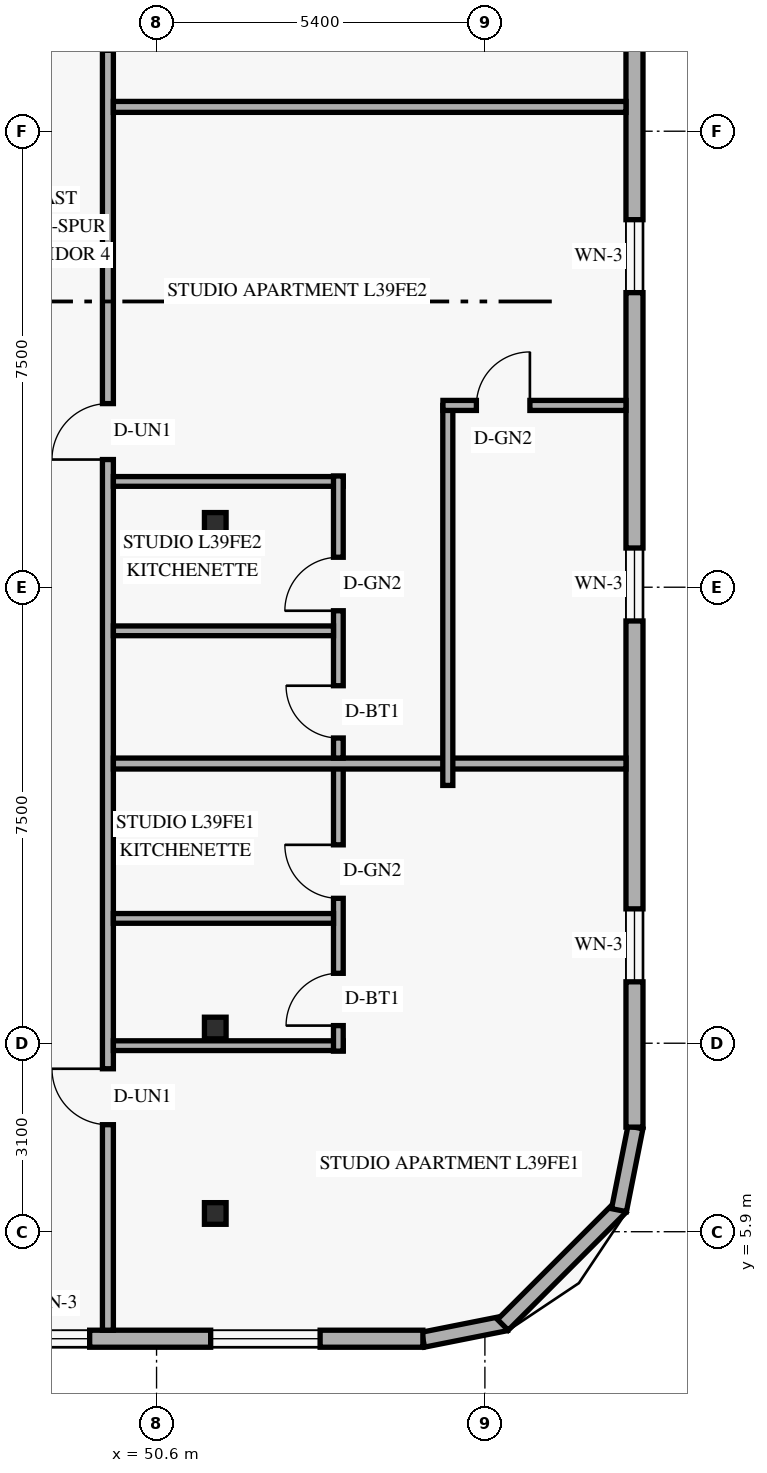
"""IFC4 building model, lengths in metres.
Left out: names, types, materials, properties, quantities, classifications, styles, units other than length and angle.
Written with IfcOpenShell. Run it as: python <this file> out.ifc"""

import sys

from ifc_helpers import new_model, si_unit, direction, frame, frame_2d, origin, origin_2d, place, context, subcontext, project, spatial, rectangle, hollow_rectangle, extrude, element, fill, save


model = new_model("IFC4")
c1 = context("Model", 3, precision=1e-05, world=origin(), true_north=direction((0.0, 1.0)))
c2 = subcontext(c1, "Body", "Model", "MODEL_VIEW")
j1 = project(units=[si_unit("LENGTHUNIT", "METRE"), si_unit("PLANEANGLEUNIT", "RADIAN")], contexts=[c1])
p1 = place(None, origin())
s1 = spatial("IfcSite", under=j1, at=p1, CompositionType="ELEMENT")
p2 = place(p1, origin())
s2 = spatial("IfcBuilding", under=s1, at=p2, CompositionType="ELEMENT")
p3 = place(p2, frame((0.0, 0.0, 151.8)))
s3 = spatial("IfcBuildingStorey", under=s2, at=p3, CompositionType="ELEMENT", Elevation=151.8)
for number, where, z_axis, x_axis in (
    (1, (51.461, 6.2, 0.0), (0.058, 0.0, 0.998), (0.0, 1.0, 0.0)),
    (2, (51.461, 9.25, 0.0), (0.058, 0.0, 0.998), (0.0, 1.0, 0.0)),
    (3, (51.461, 17.55, 0.0), (0.058, 0.0, 0.998), (0.0, 1.0, 0.0)),
):
    element("IfcColumn", number, at=place(p3, frame(where, z_axis=z_axis, x_axis=x_axis)), inside=s3, PredefinedType="COLUMN", context=c2, shape_type="SweptSolid", body=[
        extrude(hollow_rectangle(XDim=0.356, YDim=0.356, WallThickness=0.016, at=origin_2d()), origin(), (0.0, 0.0, 1.0), 3.606),
    ])
p4 = place(p3, frame((54.983, 4.124, 0.0), z_axis=(0.0, 0.0, 1.0), x_axis=(0.980809899341, 0.19496651342, 0.0)))
e4 = element("IfcWall", 4, at=p4, inside=s3, PredefinedType="SOLIDWALL", context=c2, shape_type="SweptSolid", body=[
    extrude(rectangle(XDim=1.389, YDim=0.25, at=frame_2d((0.694, 0.0))), origin(), (0.0, 0.0, 1.0), 3.36),
])
p5 = place(p3, frame((56.295, 4.368, 0.0), z_axis=(0.0, 0.0, 1.0), x_axis=(0.707106781187, 0.707106781187, 0.0)))
e5 = element("IfcWall", 5, at=p5, inside=s3, PredefinedType="SOLIDWALL", context=c2, shape_type="SweptSolid", body=[
    extrude(rectangle(XDim=2.739, YDim=0.25, at=frame_2d((1.37, 0.0))), origin(), (0.0, 0.0, 1.0), 3.36),
])
p6 = place(p3, frame((58.205, 6.254, 0.0), z_axis=(0.0, 0.0, 1.0), x_axis=(0.19496651342, 0.980809899341, 0.0)))
e6 = element("IfcWall", 6, at=p6, inside=s3, PredefinedType="SOLIDWALL", context=c2, shape_type="SweptSolid", body=[
    extrude(rectangle(XDim=1.389, YDim=0.25, at=frame_2d((0.694, 0.0))), origin(), (0.0, 0.0, 1.0), 3.36),
])
p7 = place(p3, frame((21.22, 4.14, 0.0), z_axis=(0.0, 0.0, 1.0), x_axis=(1.0, 0.0, 0.0)))
e7 = element("IfcWall", 7, at=p7, inside=s3, PredefinedType="SOLIDWALL", context=c2, shape_type="SweptSolid", body=[
    extrude(rectangle(XDim=33.76, YDim=0.28, at=frame_2d((16.88, 0.0))), origin(), (0.0, 0.0, 1.0), 3.36),
])
p8 = place(p7, frame((2.605, 0.0, 0.85)))
e8 = element("IfcOpeningElement", 8, at=p8, cuts=e7, PredefinedType="OPENING", context=c2, shape_type="SweptSolid", body=[
    extrude(rectangle(XDim=1.8, YDim=1.6, at=frame_2d((0.9, 0.8))), frame((0.0, 0.15, 0.0), z_axis=(0.0, -1.0, 0.0), x_axis=(1.0, 0.0, 0.0)), (0.0, 0.0, 1.0), 0.3),
])
p9 = place(p7, frame((9.49, 0.0, 0.85)))
e9 = element("IfcOpeningElement", 9, at=p9, cuts=e7, PredefinedType="OPENING", context=c2, shape_type="SweptSolid", body=[
    extrude(rectangle(XDim=1.8, YDim=1.6, at=frame_2d((0.9, 0.8))), frame((0.0, 0.15, 0.0), z_axis=(0.0, -1.0, 0.0), x_axis=(1.0, 0.0, 0.0)), (0.0, 0.0, 1.0), 0.3),
])
p10 = place(p7, frame((14.765, 0.0, 0.85)))
e10 = element("IfcOpeningElement", 10, at=p10, cuts=e7, PredefinedType="OPENING", context=c2, shape_type="SweptSolid", body=[
    extrude(rectangle(XDim=1.8, YDim=1.6, at=frame_2d((0.9, 0.8))), frame((0.0, 0.15, 0.0), z_axis=(0.0, -1.0, 0.0), x_axis=(1.0, 0.0, 0.0)), (0.0, 0.0, 1.0), 0.3),
])
p11 = place(p7, frame((19.325, 0.0, 0.85)))
e11 = element("IfcOpeningElement", 11, at=p11, cuts=e7, PredefinedType="OPENING", context=c2, shape_type="SweptSolid", body=[
    extrude(rectangle(XDim=1.8, YDim=1.6, at=frame_2d((0.9, 0.8))), frame((0.0, 0.15, 0.0), z_axis=(0.0, -1.0, 0.0), x_axis=(1.0, 0.0, 0.0)), (0.0, 0.0, 1.0), 0.3),
])
p12 = place(p7, frame((24.15, 0.0, 0.85)))
e12 = element("IfcOpeningElement", 12, at=p12, cuts=e7, PredefinedType="OPENING", context=c2, shape_type="SweptSolid", body=[
    extrude(rectangle(XDim=1.8, YDim=1.6, at=frame_2d((0.9, 0.8))), frame((0.0, 0.15, 0.0), z_axis=(0.0, -1.0, 0.0), x_axis=(1.0, 0.0, 0.0)), (0.0, 0.0, 1.0), 0.3),
])
p13 = place(p7, frame((27.08, 0.0, 0.85)))
e13 = element("IfcOpeningElement", 13, at=p13, cuts=e7, PredefinedType="OPENING", context=c2, shape_type="SweptSolid", body=[
    extrude(rectangle(XDim=1.2, YDim=1.5, at=frame_2d((0.6, 0.75))), frame((0.0, 0.15, 0.0), z_axis=(0.0, -1.0, 0.0), x_axis=(1.0, 0.0, 0.0)), (0.0, 0.0, 1.0), 0.3),
])
p14 = place(p7, frame((30.27, 0.0, 0.85)))
e14 = element("IfcOpeningElement", 14, at=p14, cuts=e7, PredefinedType="OPENING", context=c2, shape_type="SweptSolid", body=[
    extrude(rectangle(XDim=1.8, YDim=1.6, at=frame_2d((0.9, 0.8))), frame((0.0, 0.15, 0.0), z_axis=(0.0, -1.0, 0.0), x_axis=(1.0, 0.0, 0.0)), (0.0, 0.0, 1.0), 0.3),
])
p15 = place(p3, frame((58.46, 7.62, 0.0), z_axis=(0.0, 0.0, 1.0), x_axis=(0.0, 1.0, 0.0)))
e15 = element("IfcWall", 15, at=p15, inside=s3, PredefinedType="SOLIDWALL", context=c2, shape_type="SweptSolid", body=[
    extrude(rectangle(XDim=32.76, YDim=0.28, at=frame_2d((16.38, 0.0))), origin(), (0.0, 0.0, 1.0), 3.36),
])
p16 = place(p15, frame((2.39, 0.0, 0.85)))
e16 = element("IfcOpeningElement", 16, at=p16, cuts=e15, PredefinedType="OPENING", context=c2, shape_type="SweptSolid", body=[
    extrude(rectangle(XDim=1.2, YDim=1.5, at=frame_2d((0.6, 0.75))), frame((0.0, 0.15, 0.0), z_axis=(0.0, -1.0, 0.0), x_axis=(1.0, 0.0, 0.0)), (0.0, 0.0, 1.0), 0.3),
])
p17 = place(p15, frame((8.325, 0.0, 0.85)))
e17 = element("IfcOpeningElement", 17, at=p17, cuts=e15, PredefinedType="OPENING", context=c2, shape_type="SweptSolid", body=[
    extrude(rectangle(XDim=1.2, YDim=1.5, at=frame_2d((0.6, 0.75))), frame((0.0, 0.15, 0.0), z_axis=(0.0, -1.0, 0.0), x_axis=(1.0, 0.0, 0.0)), (0.0, 0.0, 1.0), 0.3),
])
p18 = place(p15, frame((13.725, 0.0, 0.85)))
e18 = element("IfcOpeningElement", 18, at=p18, cuts=e15, PredefinedType="OPENING", context=c2, shape_type="SweptSolid", body=[
    extrude(rectangle(XDim=1.2, YDim=1.5, at=frame_2d((0.6, 0.75))), frame((0.0, 0.15, 0.0), z_axis=(0.0, -1.0, 0.0), x_axis=(1.0, 0.0, 0.0)), (0.0, 0.0, 1.0), 0.3),
])
p19 = place(p15, frame((19.649, 0.0, 0.85)))
e19 = element("IfcOpeningElement", 19, at=p19, cuts=e15, PredefinedType="OPENING", context=c2, shape_type="SweptSolid", body=[
    extrude(rectangle(XDim=1.2, YDim=1.5, at=frame_2d((0.6, 0.75))), frame((0.0, 0.15, 0.0), z_axis=(0.0, -1.0, 0.0), x_axis=(1.0, 0.0, 0.0)), (0.0, 0.0, 1.0), 0.3),
])
p20 = place(p15, frame((24.849, 0.0, 0.85)))
e20 = element("IfcOpeningElement", 20, at=p20, cuts=e15, PredefinedType="OPENING", context=c2, shape_type="SweptSolid", body=[
    extrude(rectangle(XDim=1.2, YDim=1.5, at=frame_2d((0.6, 0.75))), frame((0.0, 0.15, 0.0), z_axis=(0.0, -1.0, 0.0), x_axis=(1.0, 0.0, 0.0)), (0.0, 0.0, 1.0), 0.3),
])
p21 = place(p15, frame((29.37, 0.0, 0.85)))
e21 = element("IfcOpeningElement", 21, at=p21, cuts=e15, PredefinedType="OPENING", context=c2, shape_type="SweptSolid", body=[
    extrude(rectangle(XDim=1.2, YDim=1.5, at=frame_2d((0.6, 0.75))), frame((0.0, 0.15, 0.0), z_axis=(0.0, -1.0, 0.0), x_axis=(1.0, 0.0, 0.0)), (0.0, 0.0, 1.0), 0.3),
])
p22 = place(p3, frame((49.8, 4.28, 0.0), z_axis=(0.0, 0.0, 1.0), x_axis=(0.0, 1.0, 0.0)))
e22 = element("IfcWall", 22, at=p22, inside=s3, PredefinedType="STANDARD", context=c2, shape_type="SweptSolid", body=[
    extrude(rectangle(XDim=39.44, YDim=0.18, at=frame_2d((19.72, 0.0))), origin(), (0.0, 0.0, 1.0), 2.73),
])
p23 = place(p22, frame((3.38, 0.0, 0.0)))
e23 = element("IfcOpeningElement", 23, at=p23, cuts=e22, PredefinedType="OPENING", context=c2, shape_type="SweptSolid", body=[
    extrude(rectangle(XDim=0.92, YDim=2.15, at=frame_2d((0.46, 1.075))), frame((0.0, 0.1, 0.0), z_axis=(0.0, -1.0, 0.0), x_axis=(1.0, 0.0, 0.0)), (0.0, 0.0, 1.0), 0.2),
])
p24 = place(p22, frame((14.32, 0.0, 0.0)))
e24 = element("IfcOpeningElement", 24, at=p24, cuts=e22, PredefinedType="OPENING", context=c2, shape_type="SweptSolid", body=[
    extrude(rectangle(XDim=0.92, YDim=2.15, at=frame_2d((0.46, 1.075))), frame((0.0, 0.1, 0.0), z_axis=(0.0, -1.0, 0.0), x_axis=(1.0, 0.0, 0.0)), (0.0, 0.0, 1.0), 0.2),
])
p25 = place(p22, frame((21.05, 0.0, 0.0)))
e25 = element("IfcOpeningElement", 25, at=p25, cuts=e22, PredefinedType="OPENING", context=c2, shape_type="SweptSolid", body=[
    extrude(rectangle(XDim=0.92, YDim=2.15, at=frame_2d((0.46, 1.075))), frame((0.0, 0.1, 0.0), z_axis=(0.0, -1.0, 0.0), x_axis=(1.0, 0.0, 0.0)), (0.0, 0.0, 1.0), 0.2),
])
p26 = place(p22, frame((35.42, 0.0, 0.0)))
e26 = element("IfcOpeningElement", 26, at=p26, cuts=e22, PredefinedType="OPENING", context=c2, shape_type="SweptSolid", body=[
    extrude(rectangle(XDim=0.92, YDim=2.15, at=frame_2d((0.46, 1.075))), frame((0.0, 0.1, 0.0), z_axis=(0.0, -1.0, 0.0), x_axis=(1.0, 0.0, 0.0)), (0.0, 0.0, 1.0), 0.2),
])
p27 = place(p3, frame((49.89, 8.96, 0.0), z_axis=(0.0, 0.0, 1.0), x_axis=(1.0, 0.0, 0.0)))
e27 = element("IfcWall", 27, at=p27, inside=s3, PredefinedType="PLUMBINGWALL", context=c2, shape_type="SweptSolid", body=[
    extrude(rectangle(XDim=3.78, YDim=0.16, at=frame_2d((1.89, 0.0))), origin(), (0.0, 0.0, 1.0), 2.879),
])
p28 = place(p3, frame((53.59, 8.87, 0.0), z_axis=(0.0, 0.0, 1.0), x_axis=(0.0, 1.0, 0.0)))
e28 = element("IfcWall", 28, at=p28, inside=s3, PredefinedType="PLUMBINGWALL", context=c2, shape_type="SweptSolid", body=[
    extrude(rectangle(XDim=4.73, YDim=0.16, at=frame_2d((2.365, 0.0))), origin(), (0.0, 0.0, 1.0), 3.36),
])
p29 = place(p28, frame((0.42, 0.0, 0.0)))
e29 = element("IfcOpeningElement", 29, at=p29, cuts=e28, PredefinedType="OPENING", context=c2, shape_type="SweptSolid", body=[
    extrude(rectangle(XDim=0.86, YDim=2.12, at=frame_2d((0.43, 1.06))), frame((0.0, 0.09, 0.0), z_axis=(0.0, -1.0, 0.0), x_axis=(1.0, 0.0, 0.0)), (0.0, 0.0, 1.0), 0.18),
])
p30 = place(p28, frame((2.513, 0.0, 0.0)))
e30 = element("IfcOpeningElement", 30, at=p30, cuts=e28, PredefinedType="OPENING", context=c2, shape_type="SweptSolid", body=[
    extrude(rectangle(XDim=0.88, YDim=2.12, at=frame_2d((0.44, 1.06))), frame((0.0, 0.09, 0.0), z_axis=(0.0, -1.0, 0.0), x_axis=(1.0, 0.0, 0.0)), (0.0, 0.0, 1.0), 0.18),
])
p31 = place(p3, frame((49.89, 11.053, 0.0), z_axis=(0.0, 0.0, 1.0), x_axis=(1.0, 0.0, 0.0)))
e31 = element("IfcWall", 31, at=p31, inside=s3, PredefinedType="PLUMBINGWALL", context=c2, shape_type="SweptSolid", body=[
    extrude(rectangle(XDim=3.62, YDim=0.16, at=frame_2d((1.81, 0.0))), origin(), (0.0, 0.0, 1.0), 2.879),
])
p32 = place(p3, frame((49.89, 13.6, 0.0), z_axis=(0.0, 0.0, 1.0), x_axis=(1.0, 0.0, 0.0)))
e32 = element("IfcWall", 32, at=p32, inside=s3, PredefinedType="PARTITIONING", context=c2, shape_type="SweptSolid", body=[
    extrude(rectangle(XDim=8.43, YDim=0.18, at=frame_2d((4.215, 0.0))), origin(), (0.0, 0.0, 1.0), 2.879),
])
p33 = place(p3, frame((49.89, 18.24, 0.0), z_axis=(0.0, 0.0, 1.0), x_axis=(1.0, 0.0, 0.0)))
e33 = element("IfcWall", 33, at=p33, inside=s3, PredefinedType="PLUMBINGWALL", context=c2, shape_type="SweptSolid", body=[
    extrude(rectangle(XDim=3.78, YDim=0.16, at=frame_2d((1.89, 0.0))), origin(), (0.0, 0.0, 1.0), 2.879),
])
p34 = place(p3, frame((53.59, 13.69, 0.0), z_axis=(0.0, 0.0, 1.0), x_axis=(0.0, 1.0, 0.0)))
e34 = element("IfcWall", 34, at=p34, inside=s3, PredefinedType="PLUMBINGWALL", context=c2, shape_type="SweptSolid", body=[
    extrude(rectangle(XDim=4.64, YDim=0.16, at=frame_2d((2.32, 0.0))), origin(), (0.0, 0.0, 1.0), 3.36),
])
p35 = place(p34, frame((0.33, 0.0, 0.0)))
e35 = element("IfcOpeningElement", 35, at=p35, cuts=e34, PredefinedType="OPENING", context=c2, shape_type="SweptSolid", body=[
    extrude(rectangle(XDim=0.86, YDim=2.12, at=frame_2d((0.43, 1.06))), frame((0.0, 0.09, 0.0), z_axis=(0.0, -1.0, 0.0), x_axis=(1.0, 0.0, 0.0)), (0.0, 0.0, 1.0), 0.18),
])
p36 = place(p34, frame((2.423, 0.0, 0.0)))
e36 = element("IfcOpeningElement", 36, at=p36, cuts=e34, PredefinedType="OPENING", context=c2, shape_type="SweptSolid", body=[
    extrude(rectangle(XDim=0.88, YDim=2.12, at=frame_2d((0.44, 1.06))), frame((0.0, 0.09, 0.0), z_axis=(0.0, -1.0, 0.0), x_axis=(1.0, 0.0, 0.0)), (0.0, 0.0, 1.0), 0.18),
])
p37 = place(p3, frame((49.89, 15.783, 0.0), z_axis=(0.0, 0.0, 1.0), x_axis=(1.0, 0.0, 0.0)))
e37 = element("IfcWall", 37, at=p37, inside=s3, PredefinedType="PLUMBINGWALL", context=c2, shape_type="SweptSolid", body=[
    extrude(rectangle(XDim=3.62, YDim=0.16, at=frame_2d((1.81, 0.0))), origin(), (0.0, 0.0, 1.0), 2.879),
])
p38 = place(p3, frame((55.39, 13.24, 0.0), z_axis=(0.0, 0.0, 1.0), x_axis=(0.0, 1.0, 0.0)))
e38 = element("IfcWall", 38, at=p38, inside=s3, PredefinedType="PARTITIONING", context=c2, shape_type="SweptSolid", body=[
    extrude(rectangle(XDim=6.25, YDim=0.165, at=frame_2d((3.125, 0.0))), origin(), (0.0, 0.0, 1.0), 3.36),
])
p39 = place(p3, frame((55.31, 19.49, 0.0), z_axis=(0.0, 0.0, 1.0), x_axis=(1.0, 0.0, 0.0)))
e39 = element("IfcWall", 39, at=p39, inside=s3, PredefinedType="PARTITIONING", context=c2, shape_type="SweptSolid", body=[
    extrude(rectangle(XDim=3.01, YDim=0.165, at=frame_2d((1.505, 0.0))), origin(), (0.0, 0.0, 1.0), 3.36),
])
p40 = place(p39, frame((0.55, 0.0, 0.0)))
e40 = element("IfcOpeningElement", 40, at=p40, cuts=e39, PredefinedType="OPENING", context=c2, shape_type="SweptSolid", body=[
    extrude(rectangle(XDim=0.88, YDim=2.12, at=frame_2d((0.44, 1.06))), frame((0.0, 0.093, 0.0), z_axis=(0.0, -1.0, 0.0), x_axis=(1.0, 0.0, 0.0)), (0.0, 0.0, 1.0), 0.185),
])
p41 = place(p3, frame((49.89, 24.4, 0.0), z_axis=(0.0, 0.0, 1.0), x_axis=(1.0, 0.0, 0.0)))
e41 = element("IfcWall", 41, at=p41, inside=s3, PredefinedType="PARTITIONING", context=c2, shape_type="SweptSolid", body=[
    extrude(rectangle(XDim=8.43, YDim=0.18, at=frame_2d((4.215, 0.0))), origin(), (0.0, 0.0, 1.0), 2.879),
])
p42 = place(p13, origin())
e42 = element("IfcWindow", 42, at=p42, inside=s3, PartitioningType="SINGLE_PANEL", PredefinedType="WINDOW", context=c2, shape_type="SweptSolid", body=[
    extrude(rectangle(XDim=1.2, YDim=1.5, at=frame_2d((0.6, 0.75))), frame((0.0, 0.03, 0.0), z_axis=(0.0, -1.0, 0.0), x_axis=(1.0, 0.0, 0.0)), (0.0, 0.0, 1.0), 0.06),
])
fill(e13, e42)
p43 = place(p14, origin())
e43 = element("IfcWindow", 43, at=p43, inside=s3, PartitioningType="SINGLE_PANEL", PredefinedType="WINDOW", context=c2, shape_type="SweptSolid", body=[
    extrude(rectangle(XDim=1.8, YDim=1.6, at=frame_2d((0.9, 0.8))), frame((0.0, 0.03, 0.0), z_axis=(0.0, -1.0, 0.0), x_axis=(1.0, 0.0, 0.0)), (0.0, 0.0, 1.0), 0.06),
])
fill(e14, e43)
p44 = place(p16, origin())
e44 = element("IfcWindow", 44, at=p44, inside=s3, PartitioningType="SINGLE_PANEL", PredefinedType="WINDOW", context=c2, shape_type="SweptSolid", body=[
    extrude(rectangle(XDim=1.2, YDim=1.5, at=frame_2d((0.6, 0.75))), frame((0.0, 0.03, 0.0), z_axis=(0.0, -1.0, 0.0), x_axis=(1.0, 0.0, 0.0)), (0.0, 0.0, 1.0), 0.06),
])
fill(e16, e44)
p45 = place(p17, origin())
e45 = element("IfcWindow", 45, at=p45, inside=s3, PartitioningType="SINGLE_PANEL", PredefinedType="WINDOW", context=c2, shape_type="SweptSolid", body=[
    extrude(rectangle(XDim=1.2, YDim=1.5, at=frame_2d((0.6, 0.75))), frame((0.0, 0.03, 0.0), z_axis=(0.0, -1.0, 0.0), x_axis=(1.0, 0.0, 0.0)), (0.0, 0.0, 1.0), 0.06),
])
fill(e17, e45)
p46 = place(p18, origin())
e46 = element("IfcWindow", 46, at=p46, inside=s3, PartitioningType="SINGLE_PANEL", PredefinedType="WINDOW", context=c2, shape_type="SweptSolid", body=[
    extrude(rectangle(XDim=1.2, YDim=1.5, at=frame_2d((0.6, 0.75))), frame((0.0, 0.03, 0.0), z_axis=(0.0, -1.0, 0.0), x_axis=(1.0, 0.0, 0.0)), (0.0, 0.0, 1.0), 0.06),
])
fill(e18, e46)
p47 = place(p23, origin())
e47 = element("IfcDoor", 47, at=p47, inside=s3, OperationType="SINGLE_SWING_RIGHT", PredefinedType="DOOR", context=c2, shape_type="SweptSolid", body=[
    extrude(rectangle(XDim=0.92, YDim=2.15, at=frame_2d((0.46, 1.075))), frame((0.0, 0.025, 0.0), z_axis=(0.0, -1.0, 0.0), x_axis=(1.0, 0.0, 0.0)), (0.0, 0.0, 1.0), 0.05),
])
fill(e23, e47)
p48 = place(p29, origin())
e48 = element("IfcDoor", 48, at=p48, inside=s3, OperationType="SINGLE_SWING_LEFT", PredefinedType="DOOR", context=c2, shape_type="SweptSolid", body=[
    extrude(rectangle(XDim=0.86, YDim=2.12, at=frame_2d((0.43, 1.06))), frame((0.0, 0.025, 0.0), z_axis=(0.0, -1.0, 0.0), x_axis=(1.0, 0.0, 0.0)), (0.0, 0.0, 1.0), 0.05),
])
fill(e29, e48)
p49 = place(p30, origin())
e49 = element("IfcDoor", 49, at=p49, inside=s3, OperationType="SINGLE_SWING_RIGHT", PredefinedType="DOOR", context=c2, shape_type="SweptSolid", body=[
    extrude(rectangle(XDim=0.88, YDim=2.12, at=frame_2d((0.44, 1.06))), frame((0.0, 0.025, 0.0), z_axis=(0.0, -1.0, 0.0), x_axis=(1.0, 0.0, 0.0)), (0.0, 0.0, 1.0), 0.05),
])
fill(e30, e49)
p50 = place(p40, origin())
e50 = element("IfcDoor", 50, at=p50, inside=s3, OperationType="SINGLE_SWING_RIGHT", PredefinedType="DOOR", context=c2, shape_type="SweptSolid", body=[
    extrude(rectangle(XDim=0.88, YDim=2.12, at=frame_2d((0.44, 1.06))), frame((0.0, 0.025, 0.0), z_axis=(0.0, -1.0, 0.0), x_axis=(1.0, 0.0, 0.0)), (0.0, 0.0, 1.0), 0.05),
])
fill(e40, e50)
p51 = place(p24, origin())
e51 = element("IfcDoor", 51, at=p51, inside=s3, OperationType="SINGLE_SWING_LEFT", PredefinedType="DOOR", context=c2, shape_type="SweptSolid", body=[
    extrude(rectangle(XDim=0.92, YDim=2.15, at=frame_2d((0.46, 1.075))), frame((0.0, 0.025, 0.0), z_axis=(0.0, -1.0, 0.0), x_axis=(1.0, 0.0, 0.0)), (0.0, 0.0, 1.0), 0.05),
])
fill(e24, e51)
p52 = place(p35, origin())
e52 = element("IfcDoor", 52, at=p52, inside=s3, OperationType="SINGLE_SWING_RIGHT", PredefinedType="DOOR", context=c2, shape_type="SweptSolid", body=[
    extrude(rectangle(XDim=0.86, YDim=2.12, at=frame_2d((0.43, 1.06))), frame((0.0, 0.025, 0.0), z_axis=(0.0, -1.0, 0.0), x_axis=(1.0, 0.0, 0.0)), (0.0, 0.0, 1.0), 0.05),
])
fill(e35, e52)
p53 = place(p36, origin())
e53 = element("IfcDoor", 53, at=p53, inside=s3, OperationType="SINGLE_SWING_LEFT", PredefinedType="DOOR", context=c2, shape_type="SweptSolid", body=[
    extrude(rectangle(XDim=0.88, YDim=2.12, at=frame_2d((0.44, 1.06))), frame((0.0, 0.025, 0.0), z_axis=(0.0, -1.0, 0.0), x_axis=(1.0, 0.0, 0.0)), (0.0, 0.0, 1.0), 0.05),
])
fill(e36, e53)
save(model, sys.argv[1])
